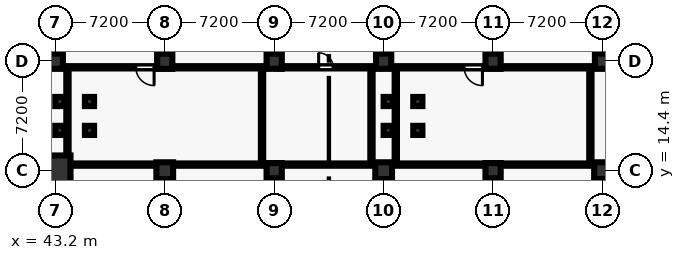
"""IFC4 building model, lengths in metres.
Left out: names, types, materials, properties, quantities, classifications, styles, units other than length and angle.
Written with IfcOpenShell. Run it as: python <this file> out.ifc"""

import sys

from ifc_helpers import new_model, si_unit, direction, frame, frame_2d, origin, origin_2d, place, context, subcontext, project, spatial, rectangle, circle, extrude, element, fill, save


model = new_model("IFC4")
c1 = context("Model", 3, precision=1e-05, world=origin(), true_north=direction((0.0, 1.0)))
c2 = subcontext(c1, "Body", "Model", "MODEL_VIEW")
j1 = project(units=[si_unit("LENGTHUNIT", "METRE"), si_unit("PLANEANGLEUNIT", "RADIAN")], contexts=[c1])
p1 = place(None, origin())
s1 = spatial("IfcSite", under=j1, at=p1, CompositionType="ELEMENT")
p2 = place(p1, origin())
s2 = spatial("IfcBuilding", under=s1, at=p2, CompositionType="ELEMENT")
p3 = place(p2, frame((0.0, 0.0, -5.4)))
s3 = spatial("IfcBuildingStorey", under=s2, at=p3, CompositionType="ELEMENT", Elevation=-5.4)
p4 = place(p3, frame((43.2, 14.4, 0.0), z_axis=(0.0, 0.0, 1.0), x_axis=(1.0, 0.0, 0.0)))
e1 = element("IfcColumn", 1, at=p4, inside=s3, PredefinedType="COLUMN", context=c2, shape_type="SweptSolid", body=[
    extrude(circle(Radius=1.0, at=origin_2d()), origin(), (0.0, 0.0, 1.0), 5.4),
])
p5 = place(p3, frame((43.2, 21.6, 0.0), z_axis=(0.0, 0.0, 1.0), x_axis=(1.0, 0.0, 0.0)))
e2 = element("IfcColumn", 2, at=p5, inside=s3, PredefinedType="COLUMN", context=c2, shape_type="SweptSolid", body=[
    extrude(rectangle(XDim=1.0, YDim=1.0, at=origin_2d()), origin(), (0.0, 0.0, 1.0), 5.4),
])
p6 = place(p3, frame((50.4, 14.4, 0.0), z_axis=(0.0, 0.0, 1.0), x_axis=(1.0, 0.0, 0.0)))
e3 = element("IfcColumn", 3, at=p6, inside=s3, PredefinedType="COLUMN", context=c2, shape_type="SweptSolid", body=[
    extrude(rectangle(XDim=1.1, YDim=1.1, at=origin_2d()), origin(), (0.0, 0.0, 1.0), 5.4),
])
p7 = place(p3, frame((50.4, 21.6, 0.0), z_axis=(0.0, 0.0, 1.0), x_axis=(1.0, 0.0, 0.0)))
e4 = element("IfcColumn", 4, at=p7, inside=s3, PredefinedType="COLUMN", context=c2, shape_type="SweptSolid", body=[
    extrude(rectangle(XDim=1.0, YDim=1.0, at=origin_2d()), origin(), (0.0, 0.0, 1.0), 5.4),
])
p8 = place(p3, frame((57.6, 14.4, 0.0), z_axis=(0.0, 0.0, 1.0), x_axis=(1.0, 0.0, 0.0)))
e5 = element("IfcColumn", 5, at=p8, inside=s3, PredefinedType="COLUMN", context=c2, shape_type="SweptSolid", body=[
    extrude(circle(Radius=0.5, at=origin_2d()), origin(), (0.0, 0.0, 1.0), 5.4),
])
p9 = place(p3, frame((57.6, 21.6, 0.0), z_axis=(0.0, 0.0, 1.0), x_axis=(1.0, 0.0, 0.0)))
e6 = element("IfcColumn", 6, at=p9, inside=s3, PredefinedType="COLUMN", context=c2, shape_type="SweptSolid", body=[
    extrude(rectangle(XDim=1.0, YDim=1.0, at=origin_2d()), origin(), (0.0, 0.0, 1.0), 5.4),
])
p10 = place(p3, frame((64.8, 14.4, 0.0), z_axis=(0.0, 0.0, 1.0), x_axis=(1.0, 0.0, 0.0)))
e7 = element("IfcColumn", 7, at=p10, inside=s3, PredefinedType="COLUMN", context=c2, shape_type="SweptSolid", body=[
    extrude(rectangle(XDim=1.1, YDim=1.1, at=origin_2d()), origin(), (0.0, 0.0, 1.0), 5.4),
])
p11 = place(p3, frame((64.8, 21.6, 0.0), z_axis=(0.0, 0.0, 1.0), x_axis=(1.0, 0.0, 0.0)))
e8 = element("IfcColumn", 8, at=p11, inside=s3, PredefinedType="COLUMN", context=c2, shape_type="SweptSolid", body=[
    extrude(rectangle(XDim=1.0, YDim=1.0, at=origin_2d()), origin(), (0.0, 0.0, 1.0), 5.4),
])
p12 = place(p3, frame((72.0, 14.4, 0.0), z_axis=(0.0, 0.0, 1.0), x_axis=(1.0, 0.0, 0.0)))
e9 = element("IfcColumn", 9, at=p12, inside=s3, PredefinedType="COLUMN", context=c2, shape_type="SweptSolid", body=[
    extrude(circle(Radius=0.5, at=origin_2d()), origin(), (0.0, 0.0, 1.0), 5.4),
])
p13 = place(p3, frame((72.0, 21.6, 0.0), z_axis=(0.0, 0.0, 1.0), x_axis=(1.0, 0.0, 0.0)))
e10 = element("IfcColumn", 10, at=p13, inside=s3, PredefinedType="COLUMN", context=c2, shape_type="SweptSolid", body=[
    extrude(rectangle(XDim=1.0, YDim=1.0, at=origin_2d()), origin(), (0.0, 0.0, 1.0), 5.4),
])
p14 = place(p3, frame((79.2, 14.4, 0.0), z_axis=(0.0, 0.0, 1.0), x_axis=(1.0, 0.0, 0.0)))
e11 = element("IfcColumn", 11, at=p14, inside=s3, PredefinedType="COLUMN", context=c2, shape_type="SweptSolid", body=[
    extrude(rectangle(XDim=1.1, YDim=1.1, at=origin_2d()), origin(), (0.0, 0.0, 1.0), 5.4),
])
p15 = place(p3, frame((79.2, 21.6, 0.0), z_axis=(0.0, 0.0, 1.0), x_axis=(1.0, 0.0, 0.0)))
e12 = element("IfcColumn", 12, at=p15, inside=s3, PredefinedType="COLUMN", context=c2, shape_type="SweptSolid", body=[
    extrude(rectangle(XDim=1.0, YDim=1.0, at=origin_2d()), origin(), (0.0, 0.0, 1.0), 5.4),
])
for number, where, z_axis, x_axis in (
    (13, (43.5, 17.05, 0.0), (0.0, 0.0, 1.0), (1.0, 0.0, 0.0)),
    (14, (45.45, 17.05, 0.0), (0.0, 0.0, 1.0), (1.0, 0.0, 0.0)),
    (15, (43.5, 18.95, 0.0), (0.0, 0.0, 1.0), (1.0, 0.0, 0.0)),
    (16, (45.45, 18.95, 0.0), (0.0, 0.0, 1.0), (1.0, 0.0, 0.0)),
    (17, (65.1, 17.05, 0.0), (0.0, 0.0, 1.0), (1.0, 0.0, 0.0)),
    (18, (67.05, 17.05, 0.0), (0.0, 0.0, 1.0), (1.0, 0.0, 0.0)),
    (19, (65.1, 18.95, 0.0), (0.0, 0.0, 1.0), (1.0, 0.0, 0.0)),
    (20, (67.05, 18.95, 0.0), (0.0, 0.0, 1.0), (1.0, 0.0, 0.0)),
):
    element("IfcColumn", number, at=place(p3, frame(where, z_axis=z_axis, x_axis=x_axis)), inside=s3, PredefinedType="COLUMN", context=c2, shape_type="SweptSolid", body=[
        extrude(rectangle(XDim=0.6, YDim=0.6, at=origin_2d()), origin(), (0.0, 0.0, 1.0), 5.4),
    ])
p16 = place(p3, frame((44.0, 14.8, 0.0), z_axis=(0.0, 0.0, 1.0), x_axis=(1.0, 0.0, 0.0)))
e21 = element("IfcWall", 21, at=p16, inside=s3, PredefinedType="PARTITIONING", context=c2, shape_type="SweptSolid", body=[
    extrude(rectangle(XDim=12.8, YDim=0.15, at=frame_2d((6.4, 0.0))), origin(), (0.0, 0.0, 1.0), 4.04),
])
p17 = place(p3, frame((56.8, 14.8, 0.0), z_axis=(0.0, 0.0, 1.0), x_axis=(0.0, 1.0, 0.0)))
e22 = element("IfcWall", 22, at=p17, inside=s3, PredefinedType="PARTITIONING", context=c2, shape_type="SweptSolid", body=[
    extrude(rectangle(XDim=6.4, YDim=0.15, at=frame_2d((3.2, 0.0))), origin(), (0.0, 0.0, 1.0), 4.04),
])
p18 = place(p3, frame((56.8, 21.2, 0.0), z_axis=(0.0, 0.0, 1.0), x_axis=(-1.0, 0.0, 0.0)))
e23 = element("IfcWall", 23, at=p18, inside=s3, PredefinedType="PARTITIONING", context=c2, shape_type="SweptSolid", body=[
    extrude(rectangle(XDim=12.8, YDim=0.15, at=frame_2d((6.4, 0.0))), origin(), (0.0, 0.0, 1.0), 4.04),
])
p19 = place(p18, frame((7.1, 0.0, 0.0)))
e24 = element("IfcOpeningElement", 24, at=p19, cuts=e23, PredefinedType="OPENING", context=c2, shape_type="SweptSolid", body=[
    extrude(rectangle(XDim=1.2, YDim=2.2, at=frame_2d((0.6, 1.1))), frame((0.0, 0.085, 0.0), z_axis=(0.0, -1.0, 0.0), x_axis=(1.0, 0.0, 0.0)), (0.0, 0.0, 1.0), 0.17),
])
p20 = place(p3, frame((44.0, 21.2, 0.0), z_axis=(0.0, 0.0, 1.0), x_axis=(0.0, -1.0, 0.0)))
e25 = element("IfcWall", 25, at=p20, inside=s3, PredefinedType="PARTITIONING", context=c2, shape_type="SweptSolid", body=[
    extrude(rectangle(XDim=6.4, YDim=0.15, at=frame_2d((3.2, 0.0))), origin(), (0.0, 0.0, 1.0), 4.04),
])
p21 = place(p3, frame((58.0, 14.8, 0.0), z_axis=(0.0, 0.0, 1.0), x_axis=(1.0, 0.0, 0.0)))
e26 = element("IfcWall", 26, at=p21, inside=s3, PredefinedType="PARTITIONING", context=c2, shape_type="SweptSolid", body=[
    extrude(rectangle(XDim=6.0, YDim=0.15, at=frame_2d((3.0, 0.0))), origin(), (0.0, 0.0, 1.0), 4.04),
])
p22 = place(p3, frame((64.0, 14.8, 0.0), z_axis=(0.0, 0.0, 1.0), x_axis=(0.0, 1.0, 0.0)))
e27 = element("IfcWall", 27, at=p22, inside=s3, PredefinedType="PARTITIONING", context=c2, shape_type="SweptSolid", body=[
    extrude(rectangle(XDim=6.4, YDim=0.15, at=frame_2d((3.2, 0.0))), origin(), (0.0, 0.0, 1.0), 4.04),
])
p23 = place(p3, frame((64.0, 21.2, 0.0), z_axis=(0.0, 0.0, 1.0), x_axis=(-1.0, 0.0, 0.0)))
e28 = element("IfcWall", 28, at=p23, inside=s3, PredefinedType="PARTITIONING", context=c2, shape_type="SweptSolid", body=[
    extrude(rectangle(XDim=6.0, YDim=0.15, at=frame_2d((3.0, 0.0))), origin(), (0.0, 0.0, 1.0), 4.04),
])
p24 = place(p23, frame((2.525, 0.0, 0.0)))
e29 = element("IfcOpeningElement", 29, at=p24, cuts=e28, PredefinedType="OPENING", context=c2, shape_type="SweptSolid", body=[
    extrude(rectangle(XDim=0.95, YDim=2.15, at=frame_2d((0.475, 1.075))), frame((0.0, 0.085, 0.0), z_axis=(0.0, -1.0, 0.0), x_axis=(1.0, 0.0, 0.0)), (0.0, 0.0, 1.0), 0.17),
])
p25 = place(p3, frame((65.6, 14.8, 0.0), z_axis=(0.0, 0.0, 1.0), x_axis=(1.0, 0.0, 0.0)))
e30 = element("IfcWall", 30, at=p25, inside=s3, PredefinedType="PARTITIONING", context=c2, shape_type="SweptSolid", body=[
    extrude(rectangle(XDim=12.8, YDim=0.15, at=frame_2d((6.4, 0.0))), origin(), (0.0, 0.0, 1.0), 4.04),
])
p26 = place(p3, frame((78.4, 14.8, 0.0), z_axis=(0.0, 0.0, 1.0), x_axis=(0.0, 1.0, 0.0)))
e31 = element("IfcWall", 31, at=p26, inside=s3, PredefinedType="PARTITIONING", context=c2, shape_type="SweptSolid", body=[
    extrude(rectangle(XDim=6.4, YDim=0.15, at=frame_2d((3.2, 0.0))), origin(), (0.0, 0.0, 1.0), 4.04),
])
p27 = place(p3, frame((78.4, 21.2, 0.0), z_axis=(0.0, 0.0, 1.0), x_axis=(-1.0, 0.0, 0.0)))
e32 = element("IfcWall", 32, at=p27, inside=s3, PredefinedType="PARTITIONING", context=c2, shape_type="SweptSolid", body=[
    extrude(rectangle(XDim=12.8, YDim=0.15, at=frame_2d((6.4, 0.0))), origin(), (0.0, 0.0, 1.0), 4.04),
])
p28 = place(p27, frame((7.1, 0.0, 0.0)))
e33 = element("IfcOpeningElement", 33, at=p28, cuts=e32, PredefinedType="OPENING", context=c2, shape_type="SweptSolid", body=[
    extrude(rectangle(XDim=1.2, YDim=2.2, at=frame_2d((0.6, 1.1))), frame((0.0, 0.085, 0.0), z_axis=(0.0, -1.0, 0.0), x_axis=(1.0, 0.0, 0.0)), (0.0, 0.0, 1.0), 0.17),
])
p29 = place(p3, frame((65.6, 21.2, 0.0), z_axis=(0.0, 0.0, 1.0), x_axis=(0.0, -1.0, 0.0)))
e34 = element("IfcWall", 34, at=p29, inside=s3, PredefinedType="PARTITIONING", context=c2, shape_type="SweptSolid", body=[
    extrude(rectangle(XDim=6.4, YDim=0.15, at=frame_2d((3.2, 0.0))), origin(), (0.0, 0.0, 1.0), 4.04),
])
p30 = place(p19, origin())
e35 = element("IfcDoor", 35, at=p30, inside=s3, OperationType="SINGLE_SWING_LEFT", PredefinedType="DOOR", context=c2, shape_type="SweptSolid", body=[
    extrude(rectangle(XDim=1.2, YDim=2.2, at=frame_2d((0.6, 1.1))), frame((0.0, 0.025, 0.0), z_axis=(0.0, -1.0, 0.0), x_axis=(1.0, 0.0, 0.0)), (0.0, 0.0, 1.0), 0.05),
])
fill(e24, e35)
p31 = place(p24, frame((0.95, 0.0, 0.0), z_axis=(0.0, 0.0, 1.0), x_axis=(-1.0, 0.0, 0.0)))
e36 = element("IfcDoor", 36, at=p31, inside=s3, OperationType="SINGLE_SWING_RIGHT", PredefinedType="DOOR", context=c2, shape_type="SweptSolid", body=[
    extrude(rectangle(XDim=0.95, YDim=2.15, at=frame_2d((0.475, 1.075))), frame((0.0, 0.025, 0.0), z_axis=(0.0, -1.0, 0.0), x_axis=(1.0, 0.0, 0.0)), (0.0, 0.0, 1.0), 0.05),
])
fill(e29, e36)
p32 = place(p28, origin())
e37 = element("IfcDoor", 37, at=p32, inside=s3, OperationType="SINGLE_SWING_LEFT", PredefinedType="DOOR", context=c2, shape_type="SweptSolid", body=[
    extrude(rectangle(XDim=1.2, YDim=2.2, at=frame_2d((0.6, 1.1))), frame((0.0, 0.025, 0.0), z_axis=(0.0, -1.0, 0.0), x_axis=(1.0, 0.0, 0.0)), (0.0, 0.0, 1.0), 0.05),
])
fill(e33, e37)
save(model, sys.argv[1])
